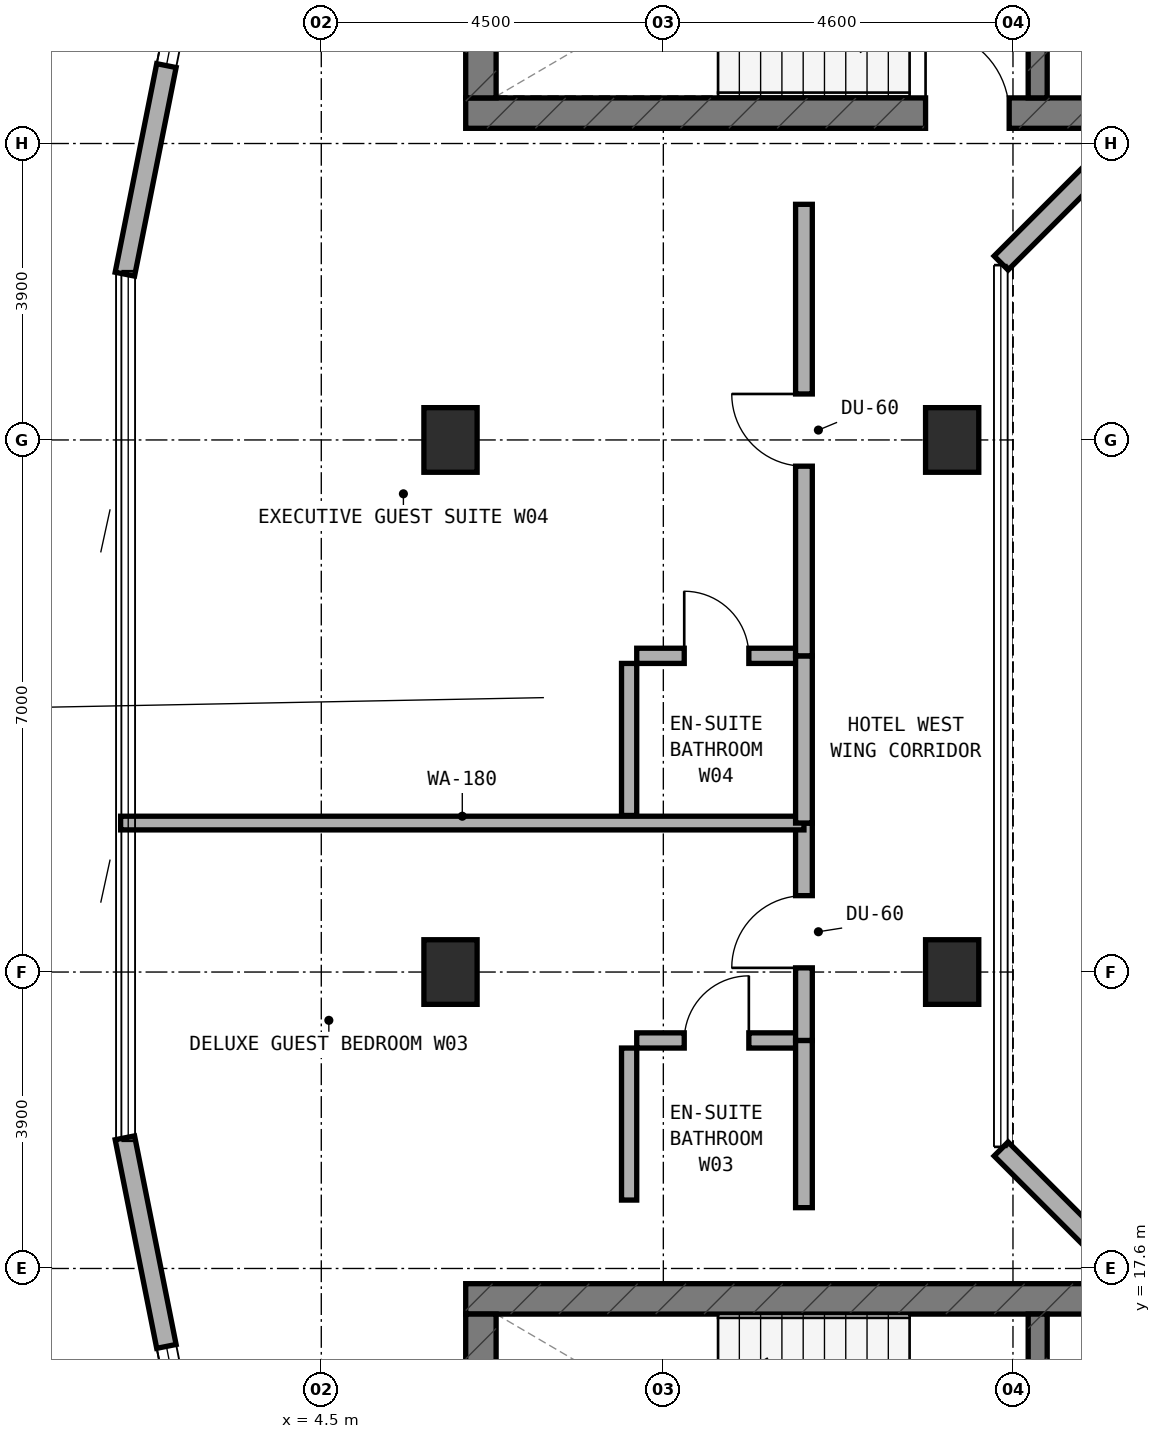
"""IFC4 building model, lengths in metres.
Left out: names, types, materials, properties, quantities, classifications, styles, units other than length and angle.
Written with IfcOpenShell. Run it as: python <this file> out.ifc"""

import sys

from ifc_helpers import new_model, si_unit, direction, frame, frame_2d, origin, origin_2d, place, context, subcontext, project, spatial, rectangle, extrude, element, fill, save


model = new_model("IFC4")
c1 = context("Model", 3, precision=1e-05, world=origin(), true_north=direction((0.0, 1.0)))
c2 = subcontext(c1, "Body", "Model", "MODEL_VIEW")
j1 = project(units=[si_unit("LENGTHUNIT", "METRE"), si_unit("PLANEANGLEUNIT", "RADIAN")], contexts=[c1])
p1 = place(None, origin())
s1 = spatial("IfcSite", under=j1, at=p1, CompositionType="ELEMENT")
p2 = place(p1, origin())
s2 = spatial("IfcBuilding", under=s1, at=p2, CompositionType="ELEMENT")
p3 = place(p2, frame((0.0, 0.0, 209.9)))
s3 = spatial("IfcBuildingStorey", under=s2, at=p3, CompositionType="ELEMENT", Elevation=209.9)
p4 = place(p3, frame((6.4, 32.8, 0.0), z_axis=(0.0, 0.0, 1.0), x_axis=(1.0, 0.0, 0.0)))
e1 = element("IfcWall", 1, at=p4, inside=s3, PredefinedType="SHEAR", context=c2, shape_type="SweptSolid", body=[
    extrude(rectangle(XDim=24.4, YDim=0.4, at=frame_2d((12.2, 0.0))), origin(), (0.0, 0.0, 1.0), 3.6),
])
p5 = place(p4, frame((6.05, 0.0, 0.0)))
e2 = element("IfcOpeningElement", 2, at=p5, cuts=e1, PredefinedType="OPENING", context=c2, shape_type="SweptSolid", body=[
    extrude(rectangle(XDim=1.1, YDim=2.15, at=frame_2d((0.55, 1.075))), frame((0.0, 0.21, 0.0), z_axis=(0.0, -1.0, 0.0), x_axis=(1.0, 0.0, 0.0)), (0.0, 0.0, 1.0), 0.42),
])
p6 = place(p3, frame((6.6, 33.0, 0.0), z_axis=(0.0, 0.0, 1.0), x_axis=(0.0, 1.0, 0.0)))
e3 = element("IfcWall", 3, at=p6, inside=s3, PredefinedType="SHEAR", context=c2, shape_type="SweptSolid", body=[
    extrude(rectangle(XDim=3.16, YDim=0.4, at=frame_2d((1.58, 0.0))), origin(), (0.0, 0.0, 1.0), 3.6),
])
p7 = place(p3, frame((13.925, 33.0, 0.0), z_axis=(0.0, 0.0, 1.0), x_axis=(0.0, 1.0, 0.0)))
e4 = element("IfcWall", 4, at=p7, inside=s3, PredefinedType="STANDARD", context=c2, shape_type="SweptSolid", body=[
    extrude(rectangle(XDim=3.16, YDim=0.25, at=frame_2d((1.58, 0.0))), origin(), (0.0, 0.0, 1.0), 3.32),
])
p8 = place(p7, frame((0.98, 0.0, 0.0)))
e5 = element("IfcOpeningElement", 5, at=p8, cuts=e4, PredefinedType="OPENING", context=c2, shape_type="SweptSolid", body=[
    extrude(rectangle(XDim=1.1, YDim=2.15, at=frame_2d((0.55, 1.075))), frame((0.0, 0.135, 0.0), z_axis=(0.0, -1.0, 0.0), x_axis=(1.0, 0.0, 0.0)), (0.0, 0.0, 1.0), 0.27),
])
p9 = place(p3, frame((6.4, 17.2, 0.0), z_axis=(0.0, 0.0, 1.0), x_axis=(1.0, 0.0, 0.0)))
e6 = element("IfcWall", 6, at=p9, inside=s3, PredefinedType="SHEAR", context=c2, shape_type="SweptSolid", body=[
    extrude(rectangle(XDim=24.4, YDim=0.4, at=frame_2d((12.2, 0.0))), origin(), (0.0, 0.0, 1.0), 3.6),
])
p10 = place(p3, frame((6.6, 13.84, 0.0), z_axis=(0.0, 0.0, 1.0), x_axis=(0.0, 1.0, 0.0)))
e7 = element("IfcWall", 7, at=p10, inside=s3, PredefinedType="SHEAR", context=c2, shape_type="SweptSolid", body=[
    extrude(rectangle(XDim=3.16, YDim=0.4, at=frame_2d((1.58, 0.0))), origin(), (0.0, 0.0, 1.0), 3.6),
])
p11 = place(p3, frame((13.925, 13.84, 0.0), z_axis=(0.0, 0.0, 1.0), x_axis=(0.0, 1.0, 0.0)))
e8 = element("IfcWall", 8, at=p11, inside=s3, PredefinedType="STANDARD", context=c2, shape_type="SweptSolid", body=[
    extrude(rectangle(XDim=3.16, YDim=0.25, at=frame_2d((1.58, 0.0))), origin(), (0.0, 0.0, 1.0), 3.32),
])
p12 = place(p11, frame((0.98, 0.0, 0.0)))
e9 = element("IfcOpeningElement", 9, at=p12, cuts=e8, PredefinedType="OPENING", context=c2, shape_type="SweptSolid", body=[
    extrude(rectangle(XDim=1.1, YDim=2.15, at=frame_2d((0.55, 1.075))), frame((0.0, 0.135, 0.0), z_axis=(0.0, -1.0, 0.0), x_axis=(1.0, 0.0, 0.0)), (0.0, 0.0, 1.0), 0.27),
])
for number, where, z_axis, x_axis in (
    (10, (6.2, 21.5, 0.0), (0.0, 0.0, 1.0), (1.0, 0.0, 0.0)),
    (11, (6.2, 28.5, 0.0), (0.0, 0.0, 1.0), (1.0, 0.0, 0.0)),
    (12, (12.8, 21.5, 0.0), (0.0, 0.0, 1.0), (1.0, 0.0, 0.0)),
    (13, (12.8, 28.5, 0.0), (0.0, 0.0, 1.0), (1.0, 0.0, 0.0)),
):
    element("IfcColumn", number, at=place(p3, frame(where, z_axis=z_axis, x_axis=x_axis)), inside=s3, PredefinedType="COLUMN", context=c2, shape_type="SweptSolid", body=[
        extrude(rectangle(XDim=0.7, YDim=0.85, at=origin_2d()), origin(), (0.0, 0.0, 1.0), 3.6),
    ])
p13 = place(p3, frame((3.629, 39.283, 0.0), z_axis=(0.0, 0.0, 1.0), x_axis=(-0.195291715883, -0.980745199176, 0.0)))
e14 = element("IfcWall", 14, at=p13, inside=s3, PredefinedType="STANDARD", context=c2, shape_type="SweptSolid", body=[
    extrude(rectangle(XDim=8.771, YDim=0.26, at=frame_2d((4.385, 0.0))), origin(), (0.0, 0.0, 1.0), 3.32),
])
p14 = place(p13, frame((3.873, 0.0, 0.85)))
e15 = element("IfcOpeningElement", 15, at=p14, cuts=e14, PredefinedType="OPENING", context=c2, shape_type="SweptSolid", body=[
    extrude(rectangle(XDim=2.1, YDim=1.5, at=frame_2d((1.05, 0.75))), frame((0.0, 0.14, 0.0), z_axis=(0.0, -1.0, 0.0), x_axis=(1.0, 0.0, 0.0)), (0.0, 0.0, 1.0), 0.28),
])
p15 = place(p3, frame((1.916, 19.319, 0.0), z_axis=(0.0, 0.0, 1.0), x_axis=(0.195291715883, -0.980745199176, 0.0)))
e16 = element("IfcWall", 16, at=p15, inside=s3, PredefinedType="STANDARD", context=c2, shape_type="SweptSolid", body=[
    extrude(rectangle(XDim=8.771, YDim=0.26, at=frame_2d((4.385, 0.0))), origin(), (0.0, 0.0, 1.0), 3.32),
])
p16 = place(p15, frame((2.798, 0.0, 0.85)))
e17 = element("IfcOpeningElement", 17, at=p16, cuts=e16, PredefinedType="OPENING", context=c2, shape_type="SweptSolid", body=[
    extrude(rectangle(XDim=2.1, YDim=1.5, at=frame_2d((1.05, 0.75))), frame((0.0, 0.14, 0.0), z_axis=(0.0, -1.0, 0.0), x_axis=(1.0, 0.0, 0.0)), (0.0, 0.0, 1.0), 0.28),
])
for number, where, z_axis, x_axis in (
    (18, (15.278, 32.662, 0.0), (0.0, 0.0, 1.0), (-0.707, -0.707, 0.0)),
    (19, (13.444, 19.172, 0.0), (0.0, 0.0, 1.0), (0.707, -0.707, 0.0)),
):
    element("IfcWall", number, at=place(p3, frame(where, z_axis=z_axis, x_axis=x_axis)), inside=s3, PredefinedType="STANDARD", context=c2, shape_type="SweptSolid", body=[
        extrude(rectangle(XDim=2.594, YDim=0.26, at=frame_2d((1.297, 0.0))), origin(), (0.0, 0.0, 1.0), 3.32),
    ])
p17 = place(p3, frame((8.65, 20.6, 0.0), z_axis=(0.0, 0.0, 1.0), x_axis=(1.0, 0.0, 0.0)))
e20 = element("IfcWall", 20, at=p17, inside=s3, PredefinedType="PLUMBINGWALL", context=c2, shape_type="SweptSolid", body=[
    extrude(rectangle(XDim=2.1, YDim=0.2, at=frame_2d((1.05, 0.0))), origin(), (0.0, 0.0, 1.0), 3.32),
])
p18 = place(p17, frame((0.625, 0.0, 0.0)))
e21 = element("IfcOpeningElement", 21, at=p18, cuts=e20, PredefinedType="OPENING", context=c2, shape_type="SweptSolid", body=[
    extrude(rectangle(XDim=0.85, YDim=2.1, at=frame_2d((0.425, 1.05))), frame((0.0, 0.11, 0.0), z_axis=(0.0, -1.0, 0.0), x_axis=(1.0, 0.0, 0.0)), (0.0, 0.0, 1.0), 0.22),
])
p19 = place(p3, frame((8.55, 18.5, 0.0), z_axis=(0.0, 0.0, 1.0), x_axis=(0.0, 1.0, 0.0)))
e22 = element("IfcWall", 22, at=p19, inside=s3, PredefinedType="PLUMBINGWALL", context=c2, shape_type="SweptSolid", body=[
    extrude(rectangle(XDim=2.0, YDim=0.2, at=frame_2d((1.0, 0.0))), origin(), (0.0, 0.0, 1.0), 3.32),
])
p20 = place(p3, frame((10.85, 18.4, 0.0), z_axis=(0.0, 0.0, 1.0), x_axis=(0.0, 1.0, 0.0)))
e23 = element("IfcWall", 23, at=p20, inside=s3, PredefinedType="SOLIDWALL", context=c2, shape_type="SweptSolid", body=[
    extrude(rectangle(XDim=2.2, YDim=0.22, at=frame_2d((1.1, 0.0))), origin(), (0.0, 0.0, 1.0), 3.32),
])
p21 = place(p3, frame((10.85, 20.6, 0.0), z_axis=(0.0, 0.0, 1.0), x_axis=(0.0, 1.0, 0.0)))
e24 = element("IfcWall", 24, at=p21, inside=s3, PredefinedType="SOLIDWALL", context=c2, shape_type="SweptSolid", body=[
    extrude(rectangle(XDim=2.86, YDim=0.22, at=frame_2d((1.43, 0.0))), origin(), (0.0, 0.0, 1.0), 2.695),
])
p22 = place(p21, frame((0.955, 0.0, 0.0)))
e25 = element("IfcOpeningElement", 25, at=p22, cuts=e24, PredefinedType="OPENING", context=c2, shape_type="SweptSolid", body=[
    extrude(rectangle(XDim=0.95, YDim=2.1, at=frame_2d((0.475, 1.05))), frame((0.0, 0.12, 0.0), z_axis=(0.0, -1.0, 0.0), x_axis=(1.0, 0.0, 0.0)), (0.0, 0.0, 1.0), 0.24),
])
p23 = place(p3, frame((1.86, 23.46, 0.0), z_axis=(0.0, 0.0, 1.0), x_axis=(1.0, 0.0, 0.0)))
e26 = element("IfcWall", 26, at=p23, inside=s3, PredefinedType="SOLIDWALL", context=c2, shape_type="SweptSolid", body=[
    extrude(rectangle(XDim=8.99, YDim=0.18, at=frame_2d((4.495, 0.0))), origin(), (0.0, 0.0, 1.0), 3.015),
])
p24 = place(p3, frame((8.65, 25.66, 0.0), z_axis=(0.0, 0.0, 1.0), x_axis=(1.0, 0.0, 0.0)))
e27 = element("IfcWall", 27, at=p24, inside=s3, PredefinedType="PLUMBINGWALL", context=c2, shape_type="SweptSolid", body=[
    extrude(rectangle(XDim=2.1, YDim=0.2, at=frame_2d((1.05, 0.0))), origin(), (0.0, 0.0, 1.0), 3.32),
])
p25 = place(p24, frame((0.625, 0.0, 0.0)))
e28 = element("IfcOpeningElement", 28, at=p25, cuts=e27, PredefinedType="OPENING", context=c2, shape_type="SweptSolid", body=[
    extrude(rectangle(XDim=0.85, YDim=2.1, at=frame_2d((0.425, 1.05))), frame((0.0, 0.11, 0.0), z_axis=(0.0, -1.0, 0.0), x_axis=(1.0, 0.0, 0.0)), (0.0, 0.0, 1.0), 0.22),
])
p26 = place(p3, frame((8.55, 23.56, 0.0), z_axis=(0.0, 0.0, 1.0), x_axis=(0.0, 1.0, 0.0)))
e29 = element("IfcWall", 29, at=p26, inside=s3, PredefinedType="PLUMBINGWALL", context=c2, shape_type="SweptSolid", body=[
    extrude(rectangle(XDim=2.0, YDim=0.2, at=frame_2d((1.0, 0.0))), origin(), (0.0, 0.0, 1.0), 3.32),
])
p27 = place(p3, frame((10.85, 23.46, 0.0), z_axis=(0.0, 0.0, 1.0), x_axis=(0.0, 1.0, 0.0)))
e30 = element("IfcWall", 30, at=p27, inside=s3, PredefinedType="SOLIDWALL", context=c2, shape_type="SweptSolid", body=[
    extrude(rectangle(XDim=2.2, YDim=0.22, at=frame_2d((1.1, 0.0))), origin(), (0.0, 0.0, 1.0), 3.32),
])
p28 = place(p3, frame((10.85, 25.66, 0.0), z_axis=(0.0, 0.0, 1.0), x_axis=(0.0, 1.0, 0.0)))
e31 = element("IfcWall", 31, at=p28, inside=s3, PredefinedType="SOLIDWALL", context=c2, shape_type="SweptSolid", body=[
    extrude(rectangle(XDim=5.94, YDim=0.22, at=frame_2d((2.97, 0.0))), origin(), (0.0, 0.0, 1.0), 2.695),
])
p29 = place(p28, frame((2.495, 0.0, 0.0)))
e32 = element("IfcOpeningElement", 32, at=p29, cuts=e31, PredefinedType="OPENING", context=c2, shape_type="SweptSolid", body=[
    extrude(rectangle(XDim=0.95, YDim=2.1, at=frame_2d((0.475, 1.05))), frame((0.0, 0.12, 0.0), z_axis=(0.0, -1.0, 0.0), x_axis=(1.0, 0.0, 0.0)), (0.0, 0.0, 1.0), 0.24),
])
p30 = place(p14, origin())
e33 = element("IfcWindow", 33, at=p30, inside=s3, PartitioningType="SINGLE_PANEL", PredefinedType="WINDOW", context=c2, shape_type="SweptSolid", body=[
    extrude(rectangle(XDim=2.1, YDim=1.5, at=frame_2d((1.05, 0.75))), frame((0.0, 0.03, 0.0), z_axis=(0.0, -1.0, 0.0), x_axis=(1.0, 0.0, 0.0)), (0.0, 0.0, 1.0), 0.06),
])
fill(e15, e33)
p31 = place(p16, origin())
e34 = element("IfcWindow", 34, at=p31, inside=s3, PartitioningType="SINGLE_PANEL", PredefinedType="WINDOW", context=c2, shape_type="SweptSolid", body=[
    extrude(rectangle(XDim=2.1, YDim=1.5, at=frame_2d((1.05, 0.75))), frame((0.0, 0.03, 0.0), z_axis=(0.0, -1.0, 0.0), x_axis=(1.0, 0.0, 0.0)), (0.0, 0.0, 1.0), 0.06),
])
fill(e17, e34)
p32 = place(p5, origin())
e35 = element("IfcDoor", 35, at=p32, inside=s3, OperationType="SINGLE_SWING_LEFT", PredefinedType="DOOR", context=c2, shape_type="SweptSolid", body=[
    extrude(rectangle(XDim=1.1, YDim=2.15, at=frame_2d((0.55, 1.075))), frame((0.0, 0.025, 0.0), z_axis=(0.0, -1.0, 0.0), x_axis=(1.0, 0.0, 0.0)), (0.0, 0.0, 1.0), 0.05),
])
fill(e2, e35)
p33 = place(p18, origin())
e36 = element("IfcDoor", 36, at=p33, inside=s3, OperationType="SINGLE_SWING_RIGHT", PredefinedType="DOOR", context=c2, shape_type="SweptSolid", body=[
    extrude(rectangle(XDim=0.85, YDim=2.1, at=frame_2d((0.425, 1.05))), frame((0.0, 0.025, 0.0), z_axis=(0.0, -1.0, 0.0), x_axis=(1.0, 0.0, 0.0)), (0.0, 0.0, 1.0), 0.05),
])
fill(e21, e36)
p34 = place(p22, origin())
e37 = element("IfcDoor", 37, at=p34, inside=s3, OperationType="SINGLE_SWING_LEFT", PredefinedType="DOOR", context=c2, shape_type="SweptSolid", body=[
    extrude(rectangle(XDim=0.95, YDim=2.1, at=frame_2d((0.475, 1.05))), frame((0.0, 0.025, 0.0), z_axis=(0.0, -1.0, 0.0), x_axis=(1.0, 0.0, 0.0)), (0.0, 0.0, 1.0), 0.05),
])
fill(e25, e37)
p35 = place(p25, origin())
e38 = element("IfcDoor", 38, at=p35, inside=s3, OperationType="SINGLE_SWING_LEFT", PredefinedType="DOOR", context=c2, shape_type="SweptSolid", body=[
    extrude(rectangle(XDim=0.85, YDim=2.1, at=frame_2d((0.425, 1.05))), frame((0.0, 0.025, 0.0), z_axis=(0.0, -1.0, 0.0), x_axis=(1.0, 0.0, 0.0)), (0.0, 0.0, 1.0), 0.05),
])
fill(e28, e38)
p36 = place(p29, origin())
e39 = element("IfcDoor", 39, at=p36, inside=s3, OperationType="SINGLE_SWING_RIGHT", PredefinedType="DOOR", context=c2, shape_type="SweptSolid", body=[
    extrude(rectangle(XDim=0.95, YDim=2.1, at=frame_2d((0.475, 1.05))), frame((0.0, 0.025, 0.0), z_axis=(0.0, -1.0, 0.0), x_axis=(1.0, 0.0, 0.0)), (0.0, 0.0, 1.0), 0.05),
])
fill(e32, e39)
save(model, sys.argv[1])
